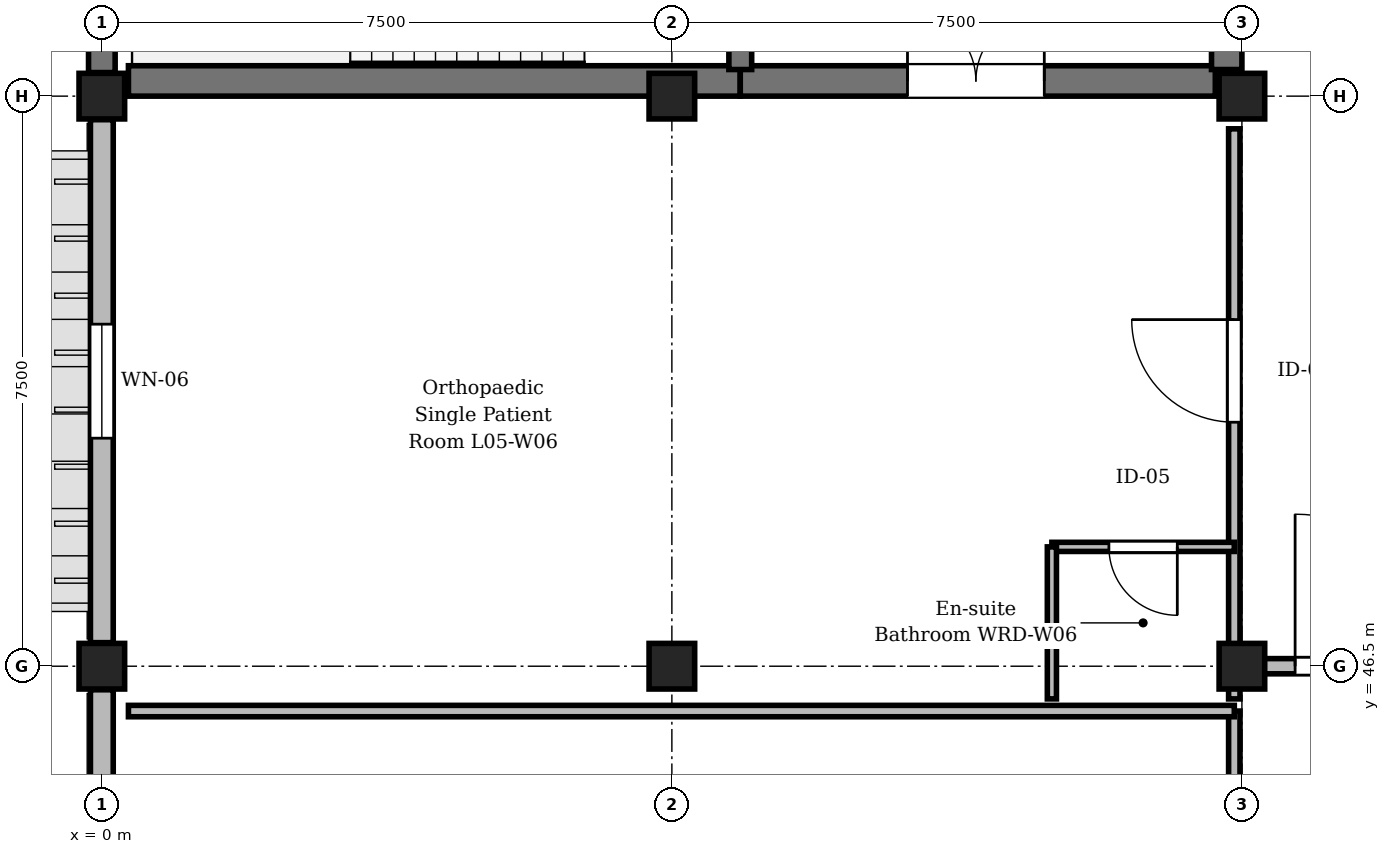
"""IFC4 building model, lengths in metres.
Left out: names, types, materials, properties, quantities, classifications, styles, units other than length and angle.
Written with IfcOpenShell. Run it as: python <this file> out.ifc"""

import sys

from ifc_helpers import new_model, si_unit, direction, frame, frame_2d, origin, origin_2d, place, context, subcontext, project, spatial, rectangle, circle, extrude, element, fill, save


model = new_model("IFC4")
c1 = context("Model", 3, precision=1e-05, world=origin(), true_north=direction((0.0, 1.0)))
c2 = subcontext(c1, "Body", "Model", "MODEL_VIEW")
j1 = project(units=[si_unit("LENGTHUNIT", "METRE"), si_unit("PLANEANGLEUNIT", "RADIAN")], contexts=[c1])
p1 = place(None, origin())
s1 = spatial("IfcSite", under=j1, at=p1, CompositionType="ELEMENT")
p2 = place(p1, origin())
s2 = spatial("IfcBuilding", under=s1, at=p2, CompositionType="ELEMENT")
p3 = place(p2, frame((0.0, 0.0, 21.9)))
s3 = spatial("IfcBuildingStorey", under=s2, at=p3, CompositionType="ELEMENT", Elevation=21.9)
p4 = place(p3, frame((0.0, 46.5, 0.0), z_axis=(0.0, 0.0, 1.0), x_axis=(1.0, 0.0, 0.0)))
e1 = element("IfcColumn", 1, at=p4, inside=s3, PredefinedType="COLUMN", context=c2, shape_type="SweptSolid", body=[
    extrude(circle(Radius=0.3, at=origin_2d()), origin(), (0.0, 0.0, 1.0), 4.05),
])
for number, where, z_axis, x_axis in (
    (2, (0.0, 54.0, 0.0), (0.0, 0.0, 1.0), (1.0, 0.0, 0.0)),
    (3, (7.5, 46.5, 0.0), (0.0, 0.0, 1.0), (1.0, 0.0, 0.0)),
    (4, (7.5, 54.0, 0.0), (0.0, 0.0, 1.0), (1.0, 0.0, 0.0)),
    (5, (15.0, 46.5, 0.0), (0.0, 0.0, 1.0), (1.0, 0.0, 0.0)),
):
    element("IfcColumn", number, at=place(p3, frame(where, z_axis=z_axis, x_axis=x_axis)), inside=s3, PredefinedType="COLUMN", context=c2, shape_type="SweptSolid", body=[
        extrude(rectangle(XDim=0.6, YDim=0.6, at=origin_2d()), origin(), (0.0, 0.0, 1.0), 4.05),
    ])
p5 = place(p3, frame((15.0, 54.0, 0.0), z_axis=(0.0, 0.0, 1.0), x_axis=(1.0, 0.0, 0.0)))
e6 = element("IfcColumn", 6, at=p5, inside=s3, PredefinedType="COLUMN", context=c2, shape_type="SweptSolid", body=[
    extrude(circle(Radius=0.3, at=origin_2d()), origin(), (0.0, 0.0, 1.0), 4.05),
])
p6 = place(p3, frame((0.0, 39.31, 0.0), z_axis=(0.0, 0.0, 1.0), x_axis=(0.0, 1.0, 0.0)))
e7 = element("IfcWall", 7, at=p6, inside=s3, PredefinedType="STANDARD", context=c2, shape_type="SweptSolid", body=[
    extrude(rectangle(XDim=6.88, YDim=0.3, at=frame_2d((3.44, 0.0))), origin(), (0.0, 0.0, 1.0), 3.17),
])
p7 = place(p6, frame((2.54, 0.0, 0.9)))
e8 = element("IfcOpeningElement", 8, at=p7, cuts=e7, PredefinedType="OPENING", context=c2, shape_type="SweptSolid", body=[
    extrude(rectangle(XDim=1.8, YDim=1.99, at=frame_2d((0.9, 0.995))), frame((0.0, 0.16, 0.0), z_axis=(0.0, -1.0, 0.0), x_axis=(1.0, 0.0, 0.0)), (0.0, 0.0, 1.0), 0.32),
])
p8 = place(p3, frame((0.0, 46.81, 0.0), z_axis=(0.0, 0.0, 1.0), x_axis=(0.0, 1.0, 0.0)))
e9 = element("IfcWall", 9, at=p8, inside=s3, PredefinedType="STANDARD", context=c2, shape_type="SweptSolid", body=[
    extrude(rectangle(XDim=6.88, YDim=0.3, at=frame_2d((3.44, 0.0))), origin(), (0.0, 0.0, 1.0), 3.17),
])
p9 = place(p8, frame((2.69, 0.0, 0.9)))
e10 = element("IfcOpeningElement", 10, at=p9, cuts=e9, PredefinedType="OPENING", context=c2, shape_type="SweptSolid", body=[
    extrude(rectangle(XDim=1.5, YDim=1.99, at=frame_2d((0.75, 0.995))), frame((0.0, 0.16, 0.0), z_axis=(0.0, -1.0, 0.0), x_axis=(1.0, 0.0, 0.0)), (0.0, 0.0, 1.0), 0.32),
])
p10 = place(p3, frame((0.0, 54.31, 0.0), z_axis=(0.0, 0.0, 1.0), x_axis=(0.0, 1.0, 0.0)))
e11 = element("IfcWall", 11, at=p10, inside=s3, PredefinedType="SHEAR", context=c2, shape_type="SweptSolid", body=[
    extrude(rectangle(XDim=6.88, YDim=0.35, at=frame_2d((3.44, 0.0))), origin(), (0.0, 0.0, 1.0), 3.77),
])
p11 = place(p3, frame((0.35, 54.2, 0.0), z_axis=(0.0, 0.0, 1.0), x_axis=(1.0, 0.0, 0.0)))
e12 = element("IfcWall", 12, at=p11, inside=s3, PredefinedType="SHEAR", context=c2, shape_type="SweptSolid", body=[
    extrude(rectangle(XDim=8.05, YDim=0.4, at=frame_2d((4.025, 0.0))), origin(), (0.0, 0.0, 1.0), 3.77),
])
p12 = place(p3, frame((8.4, 54.2, 0.0), z_axis=(0.0, 0.0, 1.0), x_axis=(1.0, 0.0, 0.0)))
e13 = element("IfcWall", 13, at=p12, inside=s3, PredefinedType="SHEAR", context=c2, shape_type="SweptSolid", body=[
    extrude(rectangle(XDim=6.25, YDim=0.4, at=frame_2d((3.125, 0.0))), origin(), (0.0, 0.0, 1.0), 3.77),
])
p13 = place(p12, frame((2.2, 0.0, 0.0)))
e14 = element("IfcOpeningElement", 14, at=p13, cuts=e13, PredefinedType="OPENING", context=c2, shape_type="SweptSolid", body=[
    extrude(rectangle(XDim=1.8, YDim=2.25, at=frame_2d((0.9, 1.125))), frame((0.0, 0.21, 0.0), z_axis=(0.0, -1.0, 0.0), x_axis=(1.0, 0.0, 0.0)), (0.0, 0.0, 1.0), 0.42),
])
p14 = place(p3, frame((14.8, 54.35, 0.0), z_axis=(0.0, 0.0, 1.0), x_axis=(0.0, 1.0, 0.0)))
e15 = element("IfcWall", 15, at=p14, inside=s3, PredefinedType="SHEAR", context=c2, shape_type="SweptSolid", body=[
    extrude(rectangle(XDim=3.75, YDim=0.4, at=frame_2d((1.875, 0.0))), origin(), (0.0, 0.0, 1.0), 3.77),
])
p15 = place(p3, frame((8.4, 58.0, 0.0), z_axis=(0.0, 0.0, 1.0), x_axis=(0.0, -1.0, 0.0)))
e16 = element("IfcWall", 16, at=p15, inside=s3, PredefinedType="SHEAR", context=c2, shape_type="SweptSolid", body=[
    extrude(rectangle(XDim=3.65, YDim=0.3, at=frame_2d((1.825, 0.0))), origin(), (0.0, 0.0, 1.0), 3.77),
])
p16 = place(p15, frame((1.22, 0.0, 0.0)))
e17 = element("IfcOpeningElement", 17, at=p16, cuts=e16, PredefinedType="OPENING", context=c2, shape_type="SweptSolid", body=[
    extrude(rectangle(XDim=1.2, YDim=2.25, at=frame_2d((0.6, 1.125))), frame((0.0, 0.16, 0.0), z_axis=(0.0, -1.0, 0.0), x_axis=(1.0, 0.0, 0.0)), (0.0, 0.0, 1.0), 0.32),
])
p17 = place(p3, frame((14.9, 38.41, 0.0), z_axis=(0.0, 0.0, 1.0), x_axis=(0.0, 1.0, 0.0)))
e18 = element("IfcWall", 18, at=p17, inside=s3, PredefinedType="PARTITIONING", context=c2, shape_type="SweptSolid", body=[
    extrude(rectangle(XDim=7.5, YDim=0.15, at=frame_2d((3.75, 0.0))), origin(), (0.0, 0.0, 1.0), 3.205),
])
p18 = place(p17, frame((3.58, 0.0, 0.0)))
e19 = element("IfcOpeningElement", 19, at=p18, cuts=e18, PredefinedType="OPENING", context=c2, shape_type="SweptSolid", body=[
    extrude(rectangle(XDim=1.45, YDim=2.3, at=frame_2d((0.725, 1.15))), frame((0.0, 0.085, 0.0), z_axis=(0.0, -1.0, 0.0), x_axis=(1.0, 0.0, 0.0)), (0.0, 0.0, 1.0), 0.17),
])
p19 = place(p3, frame((14.9, 46.07, 0.0), z_axis=(0.0, 0.0, 1.0), x_axis=(0.0, 1.0, 0.0)))
e20 = element("IfcWall", 20, at=p19, inside=s3, PredefinedType="PARTITIONING", context=c2, shape_type="SweptSolid", body=[
    extrude(rectangle(XDim=7.5, YDim=0.15, at=frame_2d((3.75, 0.0))), origin(), (0.0, 0.0, 1.0), 3.205),
])
p20 = place(p19, frame((3.64, 0.0, 0.0)))
e21 = element("IfcOpeningElement", 21, at=p20, cuts=e20, PredefinedType="OPENING", context=c2, shape_type="SweptSolid", body=[
    extrude(rectangle(XDim=1.35, YDim=2.25, at=frame_2d((0.675, 1.125))), frame((0.0, 0.085, 0.0), z_axis=(0.0, -1.0, 0.0), x_axis=(1.0, 0.0, 0.0)), (0.0, 0.0, 1.0), 0.17),
])
p21 = place(p3, frame((14.9, 48.07, 0.0), z_axis=(0.0, 0.0, 1.0), x_axis=(-1.0, 0.0, 0.0)))
e22 = element("IfcWall", 22, at=p21, inside=s3, PredefinedType="PARTITIONING", context=c2, shape_type="SweptSolid", body=[
    extrude(rectangle(XDim=2.4, YDim=0.12, at=frame_2d((1.2, 0.0))), origin(), (0.0, 0.0, 1.0), 3.755),
])
p22 = place(p21, frame((0.75, 0.0, 0.0)))
e23 = element("IfcOpeningElement", 23, at=p22, cuts=e22, PredefinedType="OPENING", context=c2, shape_type="SweptSolid", body=[
    extrude(rectangle(XDim=0.9, YDim=2.1, at=frame_2d((0.45, 1.05))), frame((0.0, 0.07, 0.0), z_axis=(0.0, -1.0, 0.0), x_axis=(1.0, 0.0, 0.0)), (0.0, 0.0, 1.0), 0.14),
])
p23 = place(p3, frame((12.5, 46.07, 0.0), z_axis=(0.0, 0.0, 1.0), x_axis=(0.0, 1.0, 0.0)))
e24 = element("IfcWall", 24, at=p23, inside=s3, PredefinedType="PARTITIONING", context=c2, shape_type="SweptSolid", body=[
    extrude(rectangle(XDim=2.0, YDim=0.12, at=frame_2d((1.0, 0.0))), origin(), (0.0, 0.0, 1.0), 3.755),
])
p24 = place(p3, frame((0.35, 45.91, 0.0), z_axis=(0.0, 0.0, 1.0), x_axis=(1.0, 0.0, 0.0)))
e25 = element("IfcWall", 25, at=p24, inside=s3, PredefinedType="PARTITIONING", context=c2, shape_type="SweptSolid", body=[
    extrude(rectangle(XDim=14.55, YDim=0.15, at=frame_2d((7.275, 0.0))), origin(), (0.0, 0.0, 1.0), 3.755),
])
p25 = place(p3, frame((15.2, 46.5, 0.0), z_axis=(0.0, 0.0, 1.0), x_axis=(1.0, 0.0, 0.0)))
e26 = element("IfcWall", 26, at=p25, inside=s3, PredefinedType="STANDARD", context=c2, shape_type="SweptSolid", body=[
    extrude(rectangle(XDim=3.0, YDim=0.2, at=frame_2d((1.5, 0.0))), origin(), (0.0, 0.0, 1.0), 3.155),
])
p26 = place(p25, frame((0.5, 0.0, 0.0)))
e27 = element("IfcOpeningElement", 27, at=p26, cuts=e26, PredefinedType="OPENING", context=c2, shape_type="SweptSolid", body=[
    extrude(rectangle(XDim=2.0, YDim=2.3, at=frame_2d((1.0, 1.15))), frame((0.0, 0.11, 0.0), z_axis=(0.0, -1.0, 0.0), x_axis=(1.0, 0.0, 0.0)), (0.0, 0.0, 1.0), 0.22),
])
p27 = place(p9, origin())
e28 = element("IfcWindow", 28, at=p27, inside=s3, PartitioningType="SINGLE_PANEL", PredefinedType="WINDOW", context=c2, shape_type="SweptSolid", body=[
    extrude(rectangle(XDim=1.5, YDim=1.99, at=frame_2d((0.75, 0.995))), frame((0.0, 0.03, 0.0), z_axis=(0.0, -1.0, 0.0), x_axis=(1.0, 0.0, 0.0)), (0.0, 0.0, 1.0), 0.06),
])
fill(e10, e28)
p28 = place(p13, origin())
e29 = element("IfcDoor", 29, at=p28, inside=s3, OperationType="DOUBLE_DOOR_SINGLE_SWING", PredefinedType="DOOR", context=c2, shape_type="SweptSolid", body=[
    extrude(rectangle(XDim=1.8, YDim=2.25, at=frame_2d((0.9, 1.125))), frame((0.0, 0.025, 0.0), z_axis=(0.0, -1.0, 0.0), x_axis=(1.0, 0.0, 0.0)), (0.0, 0.0, 1.0), 0.05),
])
fill(e14, e29)
p29 = place(p20, origin())
e30 = element("IfcDoor", 30, at=p29, inside=s3, OperationType="SINGLE_SWING_RIGHT", PredefinedType="DOOR", context=c2, shape_type="SweptSolid", body=[
    extrude(rectangle(XDim=1.35, YDim=2.25, at=frame_2d((0.675, 1.125))), frame((0.0, 0.025, 0.0), z_axis=(0.0, -1.0, 0.0), x_axis=(1.0, 0.0, 0.0)), (0.0, 0.0, 1.0), 0.05),
])
fill(e21, e30)
p30 = place(p22, origin())
e31 = element("IfcDoor", 31, at=p30, inside=s3, OperationType="SINGLE_SWING_LEFT", PredefinedType="DOOR", context=c2, shape_type="SweptSolid", body=[
    extrude(rectangle(XDim=0.9, YDim=2.1, at=frame_2d((0.45, 1.05))), frame((0.0, 0.025, 0.0), z_axis=(0.0, -1.0, 0.0), x_axis=(1.0, 0.0, 0.0)), (0.0, 0.0, 1.0), 0.05),
])
fill(e23, e31)
p31 = place(p26, origin())
e32 = element("IfcDoor", 32, at=p31, inside=s3, OperationType="DOUBLE_DOOR_SINGLE_SWING", PredefinedType="DOOR", context=c2, shape_type="SweptSolid", body=[
    extrude(rectangle(XDim=2.0, YDim=2.3, at=frame_2d((1.0, 1.15))), frame((0.0, 0.025, 0.0), z_axis=(0.0, -1.0, 0.0), x_axis=(1.0, 0.0, 0.0)), (0.0, 0.0, 1.0), 0.05),
])
fill(e27, e32)
save(model, sys.argv[1])
